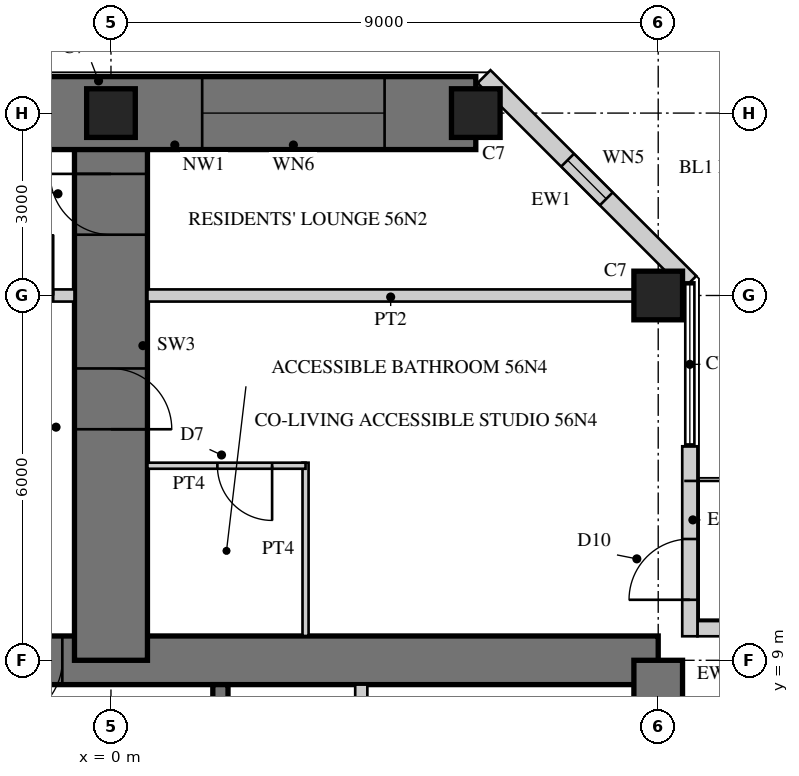
"""IFC4 building model, lengths in metres.
Left out: names, types, materials, properties, quantities, classifications, styles, units other than length and angle.
Written with IfcOpenShell. Run it as: python <this file> out.ifc"""

import sys

from ifc_helpers import new_model, si_unit, direction, frame, frame_2d, origin, origin_2d, place, context, subcontext, project, spatial, rectangle, hollow_rectangle, extrude, element, fill, save


model = new_model("IFC4")
c1 = context("Model", 3, precision=1e-05, world=origin(), true_north=direction((0.0, 1.0)))
c2 = subcontext(c1, "Body", "Model", "MODEL_VIEW")
j1 = project(units=[si_unit("LENGTHUNIT", "METRE"), si_unit("PLANEANGLEUNIT", "RADIAN")], contexts=[c1])
p1 = place(None, origin())
s1 = spatial("IfcSite", under=j1, at=p1, CompositionType="ELEMENT")
p2 = place(p1, origin())
s2 = spatial("IfcBuilding", under=s1, at=p2, CompositionType="ELEMENT")
p3 = place(p2, frame((0.0, 0.0, 222.1)))
s3 = spatial("IfcBuildingStorey", under=s2, at=p3, CompositionType="ELEMENT", Elevation=222.1)
p4 = place(p3, frame((9.0, 9.0, 0.0), z_axis=(0.0, 0.0, 1.0), x_axis=(-1.0, 0.0, 0.0)))
e1 = element("IfcWall", 1, at=p4, inside=s3, PredefinedType="SHEAR", context=c2, shape_type="SweptSolid", body=[
    extrude(rectangle(XDim=18.0, YDim=0.8, at=frame_2d((9.0, 0.0))), origin(), (0.0, 0.0, 1.0), 3.4),
])
p5 = place(p4, frame((9.8, 0.0, 0.0)))
e2 = element("IfcOpeningElement", 2, at=p5, cuts=e1, PredefinedType="OPENING", context=c2, shape_type="SweptSolid", body=[
    extrude(rectangle(XDim=1.0, YDim=2.4, at=frame_2d((0.5, 1.2))), frame((0.0, 0.41, 0.0), z_axis=(0.0, -1.0, 0.0), x_axis=(1.0, 0.0, 0.0)), (0.0, 0.0, 1.0), 0.82),
])
p6 = place(p3, frame((9.0, -9.0, 0.0), z_axis=(0.0, 0.0, 1.0), x_axis=(0.0, 1.0, 0.0)))
e3 = element("IfcWall", 3, at=p6, inside=s3, PredefinedType="SHEAR", context=c2, shape_type="SweptSolid", body=[
    extrude(rectangle(XDim=18.0, YDim=0.8, at=frame_2d((9.0, 0.0))), origin(), (0.0, 0.0, 1.0), 3.4),
])
p7 = place(p6, frame((9.8, 0.0, 0.0)))
e4 = element("IfcOpeningElement", 4, at=p7, cuts=e3, PredefinedType="OPENING", context=c2, shape_type="SweptSolid", body=[
    extrude(rectangle(XDim=1.0, YDim=2.4, at=frame_2d((0.5, 1.2))), frame((0.0, 0.41, 0.0), z_axis=(0.0, -1.0, 0.0), x_axis=(1.0, 0.0, 0.0)), (0.0, 0.0, 1.0), 0.82),
])
p8 = place(p3, frame((1.8, 1.875, 0.0), z_axis=(0.0, 0.0, 1.0), x_axis=(0.0, 1.0, 0.0)))
e5 = element("IfcWall", 5, at=p8, inside=s3, PredefinedType="SHEAR", context=c2, shape_type="SweptSolid", body=[
    extrude(rectangle(XDim=6.725, YDim=0.25, at=frame_2d((3.363, 0.0))), origin(), (0.0, 0.0, 1.0), 3.4),
])
p9 = place(p8, frame((1.875, 0.0, 0.0)))
e6 = element("IfcOpeningElement", 6, at=p9, cuts=e5, PredefinedType="OPENING", context=c2, shape_type="SweptSolid", body=[
    extrude(rectangle(XDim=1.6, YDim=2.4, at=frame_2d((0.8, 1.2))), frame((0.0, 0.135, 0.0), z_axis=(0.0, -1.0, 0.0), x_axis=(1.0, 0.0, 0.0)), (0.0, 0.0, 1.0), 0.27),
])
p10 = place(p3, frame((4.117, 5.975, 0.0), z_axis=(0.0, 0.0, 1.0), x_axis=(0.0, 1.0, 0.0)))
e7 = element("IfcWall", 7, at=p10, inside=s3, PredefinedType="PARTITIONING", context=c2, shape_type="SweptSolid", body=[
    extrude(rectangle(XDim=2.625, YDim=0.2, at=frame_2d((1.312, 0.0))), origin(), (0.0, 0.0, 1.0), 3.4),
])
p11 = place(p3, frame((0.0, 9.0, 0.0), z_axis=(0.0, 0.0, 1.0), x_axis=(0.0, 1.0, 0.0)))
e8 = element("IfcWall", 8, at=p11, inside=s3, PredefinedType="SHEAR", context=c2, shape_type="SweptSolid", body=[
    extrude(rectangle(XDim=9.0, YDim=1.2, at=frame_2d((4.5, 0.0))), origin(), (0.0, 0.0, 1.0), 3.4),
])
p12 = place(p11, frame((3.8, 0.0, 0.0)))
e9 = element("IfcOpeningElement", 9, at=p12, cuts=e8, PredefinedType="OPENING", context=c2, shape_type="SweptSolid", body=[
    extrude(rectangle(XDim=1.0, YDim=2.15, at=frame_2d((0.5, 1.075))), frame((0.0, 0.61, 0.0), z_axis=(0.0, -1.0, 0.0), x_axis=(1.0, 0.0, 0.0)), (0.0, 0.0, 1.0), 1.22),
])
p13 = place(p11, frame((7.0, 0.0, 0.0)))
e10 = element("IfcOpeningElement", 10, at=p13, cuts=e8, PredefinedType="OPENING", context=c2, shape_type="SweptSolid", body=[
    extrude(rectangle(XDim=1.0, YDim=2.2, at=frame_2d((0.5, 1.1))), frame((0.0, 0.61, 0.0), z_axis=(0.0, -1.0, 0.0), x_axis=(1.0, 0.0, 0.0)), (0.0, 0.0, 1.0), 1.22),
])
p14 = place(p3, frame((6.0, 18.0, 0.0), z_axis=(0.0, 0.0, 1.0), x_axis=(-1.0, 0.0, 0.0)))
e11 = element("IfcWall", 11, at=p14, inside=s3, PredefinedType="SHEAR", context=c2, shape_type="SweptSolid", body=[
    extrude(rectangle(XDim=12.0, YDim=1.2, at=frame_2d((6.0, 0.0))), origin(), (0.0, 0.0, 1.0), 3.4),
])
p15 = place(p14, frame((1.5, 0.0, 0.6)))
e12 = element("IfcOpeningElement", 12, at=p15, cuts=e11, PredefinedType="OPENING", context=c2, shape_type="SweptSolid", body=[
    extrude(rectangle(XDim=3.0, YDim=2.4, at=frame_2d((1.5, 1.2))), frame((0.0, 0.61, 0.0), z_axis=(0.0, -1.0, 0.0), x_axis=(1.0, 0.0, 0.0)), (0.0, 0.0, 1.0), 1.22),
])
p16 = place(p14, frame((7.5, 0.0, 0.6)))
e13 = element("IfcOpeningElement", 13, at=p16, cuts=e11, PredefinedType="OPENING", context=c2, shape_type="SweptSolid", body=[
    extrude(rectangle(XDim=3.0, YDim=2.4, at=frame_2d((1.5, 1.2))), frame((0.0, 0.61, 0.0), z_axis=(0.0, -1.0, 0.0), x_axis=(1.0, 0.0, 0.0)), (0.0, 0.0, 1.0), 1.22),
])
for number, where, z_axis, x_axis in (
    (14, (9.0, 15.0, 0.0), (0.0, 0.0, 1.0), (1.0, 0.0, 0.0)),
    (15, (6.0, 18.0, 0.0), (0.0, 0.0, 1.0), (1.0, 0.0, 0.0)),
    (16, (0.0, 18.0, 0.0), (0.0, 0.0, 1.0), (1.0, 0.0, 0.0)),
):
    element("IfcColumn", number, at=place(p3, frame(where, z_axis=z_axis, x_axis=x_axis)), inside=s3, PredefinedType="COLUMN", context=c2, shape_type="SweptSolid", body=[
        extrude(rectangle(XDim=0.8, YDim=0.8, at=origin_2d()), origin(), (0.0, 0.0, 1.0), 3.4),
    ])
p17 = place(p3, frame((12.52, 9.52, 0.0), z_axis=(0.0, 0.0, 1.0), x_axis=(-1.0, 0.0, 0.0)))
e17 = element("IfcWall", 17, at=p17, inside=s3, PredefinedType="SOLIDWALL", context=c2, shape_type="SweptSolid", body=[
    extrude(rectangle(XDim=2.875, YDim=0.25, at=frame_2d((1.438, 0.0))), origin(), (0.0, 0.0, 1.0), 3.22),
])
p18 = place(p17, frame((0.6, 0.0, 0.0)))
e18 = element("IfcOpeningElement", 18, at=p18, cuts=e17, PredefinedType="OPENING", context=c2, shape_type="SweptSolid", body=[
    extrude(rectangle(XDim=1.0, YDim=2.2, at=frame_2d((0.5, 1.1))), frame((0.0, 0.135, 0.0), z_axis=(0.0, -1.0, 0.0), x_axis=(1.0, 0.0, 0.0)), (0.0, 0.0, 1.0), 0.27),
])
p19 = place(p3, frame((9.52, 9.395, 0.0), z_axis=(0.0, 0.0, 1.0), x_axis=(0.0, 1.0, 0.0)))
e19 = element("IfcWall", 19, at=p19, inside=s3, PredefinedType="SOLIDWALL", context=c2, shape_type="SweptSolid", body=[
    extrude(rectangle(XDim=3.125, YDim=0.25, at=frame_2d((1.562, 0.0))), origin(), (0.0, 0.0, 1.0), 3.22),
])
p20 = place(p19, frame((0.6, 0.0, 0.0)))
e20 = element("IfcOpeningElement", 20, at=p20, cuts=e19, PredefinedType="OPENING", context=c2, shape_type="SweptSolid", body=[
    extrude(rectangle(XDim=1.0, YDim=2.2, at=frame_2d((0.5, 1.1))), frame((0.0, 0.135, 0.0), z_axis=(0.0, -1.0, 0.0), x_axis=(1.0, 0.0, 0.0)), (0.0, 0.0, 1.0), 0.27),
])
p21 = place(p3, frame((9.52, 15.215, 0.0), z_axis=(0.0, 0.0, 1.0), x_axis=(-0.707081278264, 0.707132283189, 0.0)))
e21 = element("IfcWall", 21, at=p21, inside=s3, PredefinedType="SOLIDWALL", context=c2, shape_type="SweptSolid", body=[
    extrude(rectangle(XDim=4.787, YDim=0.3, at=frame_2d((2.393, 0.0))), origin(), (0.0, 0.0, 1.0), 3.22),
])
p22 = place(p21, frame((1.943, 0.0, 0.3)))
e22 = element("IfcOpeningElement", 22, at=p22, cuts=e21, PredefinedType="OPENING", context=c2, shape_type="SweptSolid", body=[
    extrude(rectangle(XDim=0.9, YDim=2.4, at=frame_2d((0.45, 1.2))), frame((0.0, 0.16, 0.0), z_axis=(0.0, -1.0, 0.0), x_axis=(1.0, 0.0, 0.0)), (0.0, 0.0, 1.0), 0.32),
])
p23 = place(p3, frame((3.2, 9.4, 0.0), z_axis=(0.0, 0.0, 1.0), x_axis=(0.0, 1.0, 0.0)))
e23 = element("IfcWall", 23, at=p23, inside=s3, PredefinedType="PARTITIONING", context=c2, shape_type="SweptSolid", body=[
    extrude(rectangle(XDim=2.85, YDim=0.1, at=frame_2d((1.425, 0.0))), origin(), (0.0, 0.0, 1.0), 3.22),
])
p24 = place(p3, frame((3.2, 12.2, 0.0), z_axis=(0.0, 0.0, 1.0), x_axis=(-1.0, 0.0, 0.0)))
e24 = element("IfcWall", 24, at=p24, inside=s3, PredefinedType="PARTITIONING", context=c2, shape_type="SweptSolid", body=[
    extrude(rectangle(XDim=2.6, YDim=0.1, at=frame_2d((1.3, 0.0))), origin(), (0.0, 0.0, 1.0), 3.22),
])
p25 = place(p24, frame((0.55, 0.0, 0.0)))
e25 = element("IfcOpeningElement", 25, at=p25, cuts=e24, PredefinedType="OPENING", context=c2, shape_type="SweptSolid", body=[
    extrude(rectangle(XDim=0.9, YDim=2.1, at=frame_2d((0.45, 1.05))), frame((0.0, 0.06, 0.0), z_axis=(0.0, -1.0, 0.0), x_axis=(1.0, 0.0, 0.0)), (0.0, 0.0, 1.0), 0.12),
])
p26 = place(p3, frame((8.6, 15.0, 0.0), z_axis=(0.0, 0.0, 1.0), x_axis=(-1.0, 0.0, 0.0)))
e26 = element("IfcWall", 26, at=p26, inside=s3, PredefinedType="SOLIDWALL", context=c2, shape_type="SweptSolid", body=[
    extrude(rectangle(XDim=8.0, YDim=0.2, at=frame_2d((4.0, 0.0))), origin(), (0.0, 0.0, 1.0), 2.52),
])
p27 = place(p3, frame((-0.6, 15.0, 0.0), z_axis=(0.0, 0.0, 1.0), x_axis=(-1.0, 0.0, 0.0)))
e27 = element("IfcWall", 27, at=p27, inside=s3, PredefinedType="SOLIDWALL", context=c2, shape_type="SweptSolid", body=[
    extrude(rectangle(XDim=8.0, YDim=0.2, at=frame_2d((4.0, 0.0))), origin(), (0.0, 0.0, 1.0), 2.52),
])
p28 = place(p27, frame((0.35, 0.0, 0.0)))
e28 = element("IfcOpeningElement", 28, at=p28, cuts=e27, PredefinedType="OPENING", context=c2, shape_type="SweptSolid", body=[
    extrude(rectangle(XDim=1.0, YDim=2.2, at=frame_2d((0.5, 1.1))), frame((0.0, 0.11, 0.0), z_axis=(0.0, -1.0, 0.0), x_axis=(1.0, 0.0, 0.0)), (0.0, 0.0, 1.0), 0.22),
])
p29 = place(p20, origin())
e29 = element("IfcDoor", 29, at=p29, inside=s3, OperationType="SINGLE_SWING_LEFT", PredefinedType="DOOR", context=c2, shape_type="SweptSolid", body=[
    extrude(hollow_rectangle(XDim=1.0, YDim=2.2, WallThickness=0.06, at=frame_2d((0.5, 1.1))), frame((0.0, 0.025, 0.0), z_axis=(0.0, -1.0, 0.0), x_axis=(1.0, 0.0, 0.0)), (0.0, 0.0, 1.0), 0.05),
    extrude(rectangle(XDim=0.879, YDim=2.079, at=frame_2d((0.5, 1.1))), frame((0.0, 0.025, 0.0), z_axis=(0.0, -1.0, 0.0), x_axis=(1.0, 0.0, 0.0)), (0.0, 0.0, 1.0), 0.05),
])
fill(e20, e29)
p30 = place(p22, origin())
e30 = element("IfcWindow", 30, at=p30, inside=s3, PartitioningType="SINGLE_PANEL", PredefinedType="WINDOW", context=c2, shape_type="SweptSolid", body=[
    extrude(hollow_rectangle(XDim=0.9, YDim=2.4, WallThickness=0.06, at=frame_2d((0.45, 1.2))), frame((0.0, 0.03, 0.0), z_axis=(0.0, -1.0, 0.0), x_axis=(1.0, 0.0, 0.0)), (0.0, 0.0, 1.0), 0.06),
    extrude(rectangle(XDim=0.779, YDim=2.279, at=frame_2d((0.45, 1.2))), frame((0.0, 0.03, 0.0), z_axis=(0.0, -1.0, 0.0), x_axis=(1.0, 0.0, 0.0)), (0.0, 0.0, 1.0), 0.06),
])
fill(e22, e30)
p31 = place(p15, origin())
e31 = element("IfcWindow", 31, at=p31, inside=s3, PartitioningType="SINGLE_PANEL", PredefinedType="WINDOW", context=c2, shape_type="SweptSolid", body=[
    extrude(hollow_rectangle(XDim=3.0, YDim=2.4, WallThickness=0.06, at=frame_2d((1.5, 1.2))), frame((0.0, 0.03, 0.0), z_axis=(0.0, -1.0, 0.0), x_axis=(1.0, 0.0, 0.0)), (0.0, 0.0, 1.0), 0.06),
    extrude(rectangle(XDim=2.879, YDim=2.279, at=frame_2d((1.5, 1.2))), frame((0.0, 0.03, 0.0), z_axis=(0.0, -1.0, 0.0), x_axis=(1.0, 0.0, 0.0)), (0.0, 0.0, 1.0), 0.06),
])
fill(e12, e31)
p32 = place(p25, origin())
e32 = element("IfcDoor", 32, at=p32, inside=s3, OperationType="SINGLE_SWING_LEFT", PredefinedType="DOOR", context=c2, shape_type="SweptSolid", body=[
    extrude(rectangle(XDim=0.9, YDim=2.1, at=frame_2d((0.45, 1.05))), frame((0.0, 0.025, 0.0), z_axis=(0.0, -1.0, 0.0), x_axis=(1.0, 0.0, 0.0)), (0.0, 0.0, 1.0), 0.05),
])
fill(e25, e32)
p33 = place(p28, frame((1.0, 0.0, 0.0), z_axis=(0.0, 0.0, 1.0), x_axis=(-1.0, 0.0, 0.0)))
e33 = element("IfcDoor", 33, at=p33, inside=s3, OperationType="SINGLE_SWING_RIGHT", PredefinedType="DOOR", context=c2, shape_type="SweptSolid", body=[
    extrude(rectangle(XDim=1.0, YDim=2.2, at=frame_2d((0.5, 1.1))), frame((0.0, 0.025, 0.0), z_axis=(0.0, -1.0, 0.0), x_axis=(1.0, 0.0, 0.0)), (0.0, 0.0, 1.0), 0.05),
])
fill(e28, e33)
p34 = place(p12, frame((1.0, 0.0, 0.0), z_axis=(0.0, 0.0, 1.0), x_axis=(-1.0, 0.0, 0.0)))
e34 = element("IfcDoor", 34, at=p34, inside=s3, OperationType="SINGLE_SWING_RIGHT", PredefinedType="DOOR", context=c2, shape_type="SweptSolid", body=[
    extrude(rectangle(XDim=1.0, YDim=2.15, at=frame_2d((0.5, 1.075))), frame((0.0, 0.025, 0.0), z_axis=(0.0, -1.0, 0.0), x_axis=(1.0, 0.0, 0.0)), (0.0, 0.0, 1.0), 0.05),
])
fill(e9, e34)
p35 = place(p13, origin())
e35 = element("IfcDoor", 35, at=p35, inside=s3, OperationType="SINGLE_SWING_RIGHT", PredefinedType="DOOR", context=c2, shape_type="SweptSolid", body=[
    extrude(rectangle(XDim=1.0, YDim=2.2, at=frame_2d((0.5, 1.1))), frame((0.0, 0.025, 0.0), z_axis=(0.0, -1.0, 0.0), x_axis=(1.0, 0.0, 0.0)), (0.0, 0.0, 1.0), 0.05),
])
fill(e10, e35)
p36 = place(p5, origin())
e36 = element("IfcDoor", 36, at=p36, inside=s3, OperationType="SINGLE_SWING_RIGHT", PredefinedType="DOOR", context=c2, shape_type="SweptSolid", body=[
    extrude(rectangle(XDim=1.0, YDim=2.4, at=frame_2d((0.5, 1.2))), frame((0.0, 0.055, 0.0), z_axis=(0.0, -1.0, 0.0), x_axis=(1.0, 0.0, 0.0)), (0.0, 0.0, 1.0), 0.05),
])
fill(e2, e36)
save(model, sys.argv[1])
